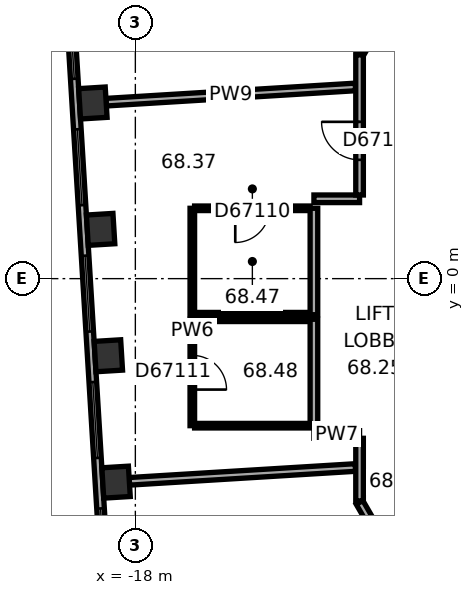
"""IFC4 building model, lengths in metres.
Left out: names, types, materials, properties, quantities, classifications, styles, units other than length and angle.
Written with IfcOpenShell. Run it as: python <this file> out.ifc"""

import sys

from ifc_helpers import new_model, si_unit, direction, frame, frame_2d, origin, origin_2d, place, context, subcontext, project, spatial, rectangle, extrude, element, fill, save


model = new_model("IFC4")
c1 = context("Model", 3, precision=1e-05, world=origin(), true_north=direction((0.0, 1.0)))
c2 = subcontext(c1, "Body", "Model", "MODEL_VIEW")
j1 = project(units=[si_unit("LENGTHUNIT", "METRE"), si_unit("PLANEANGLEUNIT", "RADIAN")], contexts=[c1])
p1 = place(None, origin())
s1 = spatial("IfcSite", under=j1, at=p1, CompositionType="ELEMENT")
p2 = place(p1, origin())
s2 = spatial("IfcBuilding", under=s1, at=p2, CompositionType="ELEMENT")
p3 = place(p2, frame((0.0, 0.0, 274.6)))
s3 = spatial("IfcBuildingStorey", under=s2, at=p3, CompositionType="ELEMENT", Elevation=274.6)
for number, where, z_axis, x_axis in (
    (1, (-19.118, 4.621, 0.0), (0.0, 0.0, 1.0), (0.061, -0.998, 0.0)),
    (2, (-18.914, 1.296, 0.0), (0.0, 0.0, 1.0), (0.061, -0.998, 0.0)),
    (3, (-18.711, -2.03, 0.0), (0.0, 0.0, 1.0), (0.061, -0.998, 0.0)),
    (4, (-18.508, -5.355, 0.0), (0.0, 0.0, 1.0), (0.061, -0.998, 0.0)),
):
    element("IfcColumn", number, at=place(p3, frame(where, z_axis=z_axis, x_axis=x_axis)), inside=s3, PredefinedType="COLUMN", context=c2, shape_type="SweptSolid", body=[
        extrude(rectangle(XDim=0.8, YDim=0.7, at=origin_2d()), origin(), (0.0, 0.0, 1.0), 3.7),
    ])
p4 = place(p3, frame((-19.803, 8.454, 0.0), z_axis=(0.0, 0.0, 1.0), x_axis=(0.061036717565, -0.998135521414, 0.0)))
e5 = element("IfcWall", 5, at=p4, inside=s3, PredefinedType="STANDARD", context=c2, shape_type="SweptSolid", body=[
    extrude(rectangle(XDim=17.731, YDim=0.2, at=frame_2d((8.866, 0.0))), origin(), (0.0, 0.0, 1.0), 3.7),
])
p5 = place(p4, frame((1.202, 0.0, 0.9)))
e6 = element("IfcOpeningElement", 6, at=p5, cuts=e5, PredefinedType="OPENING", context=c2, shape_type="SweptSolid", body=[
    extrude(rectangle(XDim=2.0, YDim=2.0, at=frame_2d((1.0, 1.0))), frame((0.0, 0.11, 0.0), z_axis=(0.0, -1.0, 0.0), x_axis=(1.0, 0.0, 0.0)), (0.0, 0.0, 1.0), 0.22),
])
p6 = place(p4, frame((4.533, 0.0, 0.9)))
e7 = element("IfcOpeningElement", 7, at=p6, cuts=e5, PredefinedType="OPENING", context=c2, shape_type="SweptSolid", body=[
    extrude(rectangle(XDim=2.0, YDim=2.0, at=frame_2d((1.0, 1.0))), frame((0.0, 0.11, 0.0), z_axis=(0.0, -1.0, 0.0), x_axis=(1.0, 0.0, 0.0)), (0.0, 0.0, 1.0), 0.22),
])
p7 = place(p4, frame((7.865, 0.0, 0.9)))
e8 = element("IfcOpeningElement", 8, at=p7, cuts=e5, PredefinedType="OPENING", context=c2, shape_type="SweptSolid", body=[
    extrude(rectangle(XDim=2.0, YDim=2.0, at=frame_2d((1.0, 1.0))), frame((0.0, 0.11, 0.0), z_axis=(0.0, -1.0, 0.0), x_axis=(1.0, 0.0, 0.0)), (0.0, 0.0, 1.0), 0.22),
])
p8 = place(p4, frame((11.197, 0.0, 0.9)))
e9 = element("IfcOpeningElement", 9, at=p8, cuts=e5, PredefinedType="OPENING", context=c2, shape_type="SweptSolid", body=[
    extrude(rectangle(XDim=2.0, YDim=2.0, at=frame_2d((1.0, 1.0))), frame((0.0, 0.11, 0.0), z_axis=(0.0, -1.0, 0.0), x_axis=(1.0, 0.0, 0.0)), (0.0, 0.0, 1.0), 0.22),
])
p9 = place(p4, frame((14.528, 0.0, 0.9)))
e10 = element("IfcOpeningElement", 10, at=p9, cuts=e5, PredefinedType="OPENING", context=c2, shape_type="SweptSolid", body=[
    extrude(rectangle(XDim=2.0, YDim=2.0, at=frame_2d((1.0, 1.0))), frame((0.0, 0.11, 0.0), z_axis=(0.0, -1.0, 0.0), x_axis=(1.0, 0.0, 0.0)), (0.0, 0.0, 1.0), 0.22),
])
p10 = place(p3, frame((-18.768, 4.643, 0.0), z_axis=(0.0, 0.0, 1.0), x_axis=(0.99813496285, 0.0610458511, 0.0)))
e11 = element("IfcWall", 11, at=p10, inside=s3, PredefinedType="PARTITIONING", context=c2, shape_type="SweptSolid", body=[
    extrude(rectangle(XDim=6.571, YDim=0.2, at=frame_2d((3.285, 0.0))), origin(), (0.0, 0.0, 1.0), 3.35),
])
p11 = place(p3, frame((-18.158, -5.333, 0.0), z_axis=(0.0, 0.0, 1.0), x_axis=(0.998135365626, 0.061039265125, 0.0)))
e12 = element("IfcWall", 12, at=p11, inside=s3, PredefinedType="PARTITIONING", context=c2, shape_type="SweptSolid", body=[
    extrude(rectangle(XDim=5.96, YDim=0.2, at=frame_2d((2.98, 0.0))), origin(), (0.0, 0.0, 1.0), 2.65),
])
p12 = place(p3, frame((-16.501, -3.869, 0.0), z_axis=(0.0, 0.0, 1.0), x_axis=(0.0, 1.0, 0.0)))
e13 = element("IfcWall", 13, at=p12, inside=s3, PredefinedType="PARTITIONING", context=c2, shape_type="SweptSolid", body=[
    extrude(rectangle(XDim=2.8, YDim=0.12, at=frame_2d((1.4, 0.0))), origin(), (0.0, 0.0, 1.0), 3.35),
])
p13 = place(p12, frame((0.95, 0.0, 0.0)))
e14 = element("IfcOpeningElement", 14, at=p13, cuts=e13, PredefinedType="OPENING", context=c2, shape_type="SweptSolid", body=[
    extrude(rectangle(XDim=0.9, YDim=2.1, at=frame_2d((0.45, 1.05))), frame((0.0, 0.07, 0.0), z_axis=(0.0, -1.0, 0.0), x_axis=(1.0, 0.0, 0.0)), (0.0, 0.0, 1.0), 0.14),
])
p14 = place(p3, frame((-16.501, -0.949, 0.0), z_axis=(0.0, 0.0, 1.0), x_axis=(0.0, 1.0, 0.0)))
e15 = element("IfcWall", 15, at=p14, inside=s3, PredefinedType="PARTITIONING", context=c2, shape_type="SweptSolid", body=[
    extrude(rectangle(XDim=2.8, YDim=0.12, at=frame_2d((1.4, 0.0))), origin(), (0.0, 0.0, 1.0), 3.35),
])
p15 = place(p3, frame((-16.441, -1.069, 0.0), z_axis=(0.0, 0.0, 1.0), x_axis=(1.0, 0.0, 0.0)))
e16 = element("IfcWall", 16, at=p15, inside=s3, PredefinedType="PARTITIONING", context=c2, shape_type="SweptSolid", body=[
    extrude(rectangle(XDim=3.04, YDim=0.12, at=frame_2d((1.52, 0.0))), origin(), (0.0, 0.0, 1.0), 3.35),
])
p16 = place(p3, frame((-16.441, 1.851, 0.0), z_axis=(0.0, 0.0, 1.0), x_axis=(1.0, 0.0, 0.0)))
e17 = element("IfcWall", 17, at=p16, inside=s3, PredefinedType="PARTITIONING", context=c2, shape_type="SweptSolid", body=[
    extrude(rectangle(XDim=3.04, YDim=0.12, at=frame_2d((1.52, 0.0))), origin(), (0.0, 0.0, 1.0), 3.35),
])
p17 = place(p16, frame((1.07, 0.0, 0.0)))
e18 = element("IfcOpeningElement", 18, at=p17, cuts=e17, PredefinedType="OPENING", context=c2, shape_type="SweptSolid", body=[
    extrude(rectangle(XDim=0.9, YDim=2.1, at=frame_2d((0.45, 1.05))), frame((0.0, 0.07, 0.0), z_axis=(0.0, -1.0, 0.0), x_axis=(1.0, 0.0, 0.0)), (0.0, 0.0, 1.0), 0.14),
])
for number, where, z_axis, x_axis in (
    (19, (-13.401, -3.869, 0.0), (0.0, 0.0, 1.0), (-1.0, 0.0, 0.0)),
    (20, (-13.401, -0.949, 0.0), (0.0, 0.0, 1.0), (-1.0, 0.0, 0.0)),
):
    element("IfcWall", number, at=place(p3, frame(where, z_axis=z_axis, x_axis=x_axis)), inside=s3, PredefinedType="PARTITIONING", context=c2, shape_type="SweptSolid", body=[
        extrude(rectangle(XDim=3.04, YDim=0.12, at=frame_2d((1.52, 0.0))), origin(), (0.0, 0.0, 1.0), 3.35),
    ])
p18 = place(p3, frame((-13.301, -4.101, 0.0), z_axis=(0.0, 0.0, 1.0), x_axis=(1.0, 0.0, 0.0)))
e21 = element("IfcWall", 21, at=p18, inside=s3, PredefinedType="PARTITIONING", context=c2, shape_type="SweptSolid", body=[
    extrude(rectangle(XDim=1.201, YDim=0.2, at=frame_2d((0.601, 0.0))), origin(), (0.0, 0.0, 1.0), 3.35),
])
p19 = place(p3, frame((-13.301, -1.069, 0.0), z_axis=(0.0, 0.0, 1.0), x_axis=(0.0, -1.0, 0.0)))
e22 = element("IfcWall", 22, at=p19, inside=s3, PredefinedType="PARTITIONING", context=c2, shape_type="SweptSolid", body=[
    extrude(rectangle(XDim=2.8, YDim=0.2, at=frame_2d((1.4, 0.0))), origin(), (0.0, 0.0, 1.0), 3.35),
])
p20 = place(p3, frame((-13.301, 1.851, 0.0), z_axis=(0.0, 0.0, 1.0), x_axis=(0.0, -1.0, 0.0)))
e23 = element("IfcWall", 23, at=p20, inside=s3, PredefinedType="PARTITIONING", context=c2, shape_type="SweptSolid", body=[
    extrude(rectangle(XDim=2.8, YDim=0.2, at=frame_2d((1.4, 0.0))), origin(), (0.0, 0.0, 1.0), 3.35),
])
p21 = place(p3, frame((-12.1, -5.889, 0.0), z_axis=(0.0, 0.0, 1.0), x_axis=(0.500063520245, -0.865988727248, 0.0)))
e24 = element("IfcWall", 24, at=p21, inside=s3, PredefinedType="PARTITIONING", context=c2, shape_type="SweptSolid", body=[
    extrude(rectangle(XDim=1.9, YDim=0.2, at=frame_2d((0.95, 0.0))), origin(), (0.0, 0.0, 1.0), 3.35),
])
p22 = place(p3, frame((-12.1, -4.201, 0.0), z_axis=(0.0, 0.0, 1.0), x_axis=(0.0, -1.0, 0.0)))
e25 = element("IfcWall", 25, at=p22, inside=s3, PredefinedType="PARTITIONING", context=c2, shape_type="SweptSolid", body=[
    extrude(rectangle(XDim=1.648, YDim=0.2, at=frame_2d((0.824, 0.0))), origin(), (0.0, 0.0, 1.0), 3.35),
])
p23 = place(p3, frame((-12.1, 2.101, 0.0), z_axis=(0.0, 0.0, 1.0), x_axis=(-1.0, 0.0, 0.0)))
e26 = element("IfcWall", 26, at=p23, inside=s3, PredefinedType="PARTITIONING", context=c2, shape_type="SweptSolid", body=[
    extrude(rectangle(XDim=1.201, YDim=0.2, at=frame_2d((0.601, 0.0))), origin(), (0.0, 0.0, 1.0), 3.35),
])
p24 = place(p3, frame((-12.1, 5.889, 0.0), z_axis=(0.0, 0.0, 1.0), x_axis=(0.0, -1.0, 0.0)))
e27 = element("IfcWall", 27, at=p24, inside=s3, PredefinedType="PARTITIONING", context=c2, shape_type="SweptSolid", body=[
    extrude(rectangle(XDim=3.688, YDim=0.2, at=frame_2d((1.844, 0.0))), origin(), (0.0, 0.0, 1.0), 3.35),
])
p25 = place(p24, frame((1.763, 0.0, 0.0)))
e28 = element("IfcOpeningElement", 28, at=p25, cuts=e27, PredefinedType="OPENING", context=c2, shape_type="SweptSolid", body=[
    extrude(rectangle(XDim=1.0, YDim=2.1, at=frame_2d((0.5, 1.05))), frame((0.0, 0.11, 0.0), z_axis=(0.0, -1.0, 0.0), x_axis=(1.0, 0.0, 0.0)), (0.0, 0.0, 1.0), 0.22),
])
p26 = place(p3, frame((-11.15, 7.534, 0.0), z_axis=(0.0, 0.0, 1.0), x_axis=(-0.500063286585, -0.865988862174, 0.0)))
e29 = element("IfcWall", 29, at=p26, inside=s3, PredefinedType="PARTITIONING", context=c2, shape_type="SweptSolid", body=[
    extrude(rectangle(XDim=1.86, YDim=0.2, at=frame_2d((0.93, 0.0))), origin(), (0.0, 0.0, 1.0), 3.35),
])
p27 = place(p5, origin())
e30 = element("IfcWindow", 30, at=p27, inside=s3, PartitioningType="SINGLE_PANEL", PredefinedType="WINDOW", context=c2, shape_type="SweptSolid", body=[
    extrude(rectangle(XDim=2.0, YDim=2.0, at=frame_2d((1.0, 1.0))), frame((0.0, 0.03, 0.0), z_axis=(0.0, -1.0, 0.0), x_axis=(1.0, 0.0, 0.0)), (0.0, 0.0, 1.0), 0.06),
])
fill(e6, e30)
p28 = place(p6, origin())
e31 = element("IfcWindow", 31, at=p28, inside=s3, PartitioningType="SINGLE_PANEL", PredefinedType="WINDOW", context=c2, shape_type="SweptSolid", body=[
    extrude(rectangle(XDim=2.0, YDim=2.0, at=frame_2d((1.0, 1.0))), frame((0.0, 0.03, 0.0), z_axis=(0.0, -1.0, 0.0), x_axis=(1.0, 0.0, 0.0)), (0.0, 0.0, 1.0), 0.06),
])
fill(e7, e31)
p29 = place(p7, origin())
e32 = element("IfcWindow", 32, at=p29, inside=s3, PartitioningType="SINGLE_PANEL", PredefinedType="WINDOW", context=c2, shape_type="SweptSolid", body=[
    extrude(rectangle(XDim=2.0, YDim=2.0, at=frame_2d((1.0, 1.0))), frame((0.0, 0.03, 0.0), z_axis=(0.0, -1.0, 0.0), x_axis=(1.0, 0.0, 0.0)), (0.0, 0.0, 1.0), 0.06),
])
fill(e8, e32)
p30 = place(p8, origin())
e33 = element("IfcWindow", 33, at=p30, inside=s3, PartitioningType="SINGLE_PANEL", PredefinedType="WINDOW", context=c2, shape_type="SweptSolid", body=[
    extrude(rectangle(XDim=2.0, YDim=2.0, at=frame_2d((1.0, 1.0))), frame((0.0, 0.03, 0.0), z_axis=(0.0, -1.0, 0.0), x_axis=(1.0, 0.0, 0.0)), (0.0, 0.0, 1.0), 0.06),
])
fill(e9, e33)
p31 = place(p9, origin())
e34 = element("IfcWindow", 34, at=p31, inside=s3, PartitioningType="SINGLE_PANEL", PredefinedType="WINDOW", context=c2, shape_type="SweptSolid", body=[
    extrude(rectangle(XDim=2.0, YDim=2.0, at=frame_2d((1.0, 1.0))), frame((0.0, 0.03, 0.0), z_axis=(0.0, -1.0, 0.0), x_axis=(1.0, 0.0, 0.0)), (0.0, 0.0, 1.0), 0.06),
])
fill(e10, e34)
p32 = place(p25, origin())
e35 = element("IfcDoor", 35, at=p32, inside=s3, OperationType="SINGLE_SWING_LEFT", PredefinedType="DOOR", context=c2, shape_type="SweptSolid", body=[
    extrude(rectangle(XDim=1.0, YDim=2.1, at=frame_2d((0.5, 1.05))), frame((0.0, 0.025, 0.0), z_axis=(0.0, -1.0, 0.0), x_axis=(1.0, 0.0, 0.0)), (0.0, 0.0, 1.0), 0.05),
])
fill(e28, e35)
p33 = place(p17, origin())
e36 = element("IfcDoor", 36, at=p33, inside=s3, OperationType="SINGLE_SWING_LEFT", PredefinedType="DOOR", context=c2, shape_type="SweptSolid", body=[
    extrude(rectangle(XDim=0.9, YDim=2.1, at=frame_2d((0.45, 1.05))), frame((0.0, 0.025, 0.0), z_axis=(0.0, -1.0, 0.0), x_axis=(1.0, 0.0, 0.0)), (0.0, 0.0, 1.0), 0.05),
])
fill(e18, e36)
p34 = place(p13, origin())
e37 = element("IfcDoor", 37, at=p34, inside=s3, OperationType="SINGLE_SWING_LEFT", PredefinedType="DOOR", context=c2, shape_type="SweptSolid", body=[
    extrude(rectangle(XDim=0.9, YDim=2.1, at=frame_2d((0.45, 1.05))), frame((0.0, 0.025, 0.0), z_axis=(0.0, -1.0, 0.0), x_axis=(1.0, 0.0, 0.0)), (0.0, 0.0, 1.0), 0.05),
])
fill(e14, e37)
save(model, sys.argv[1])
